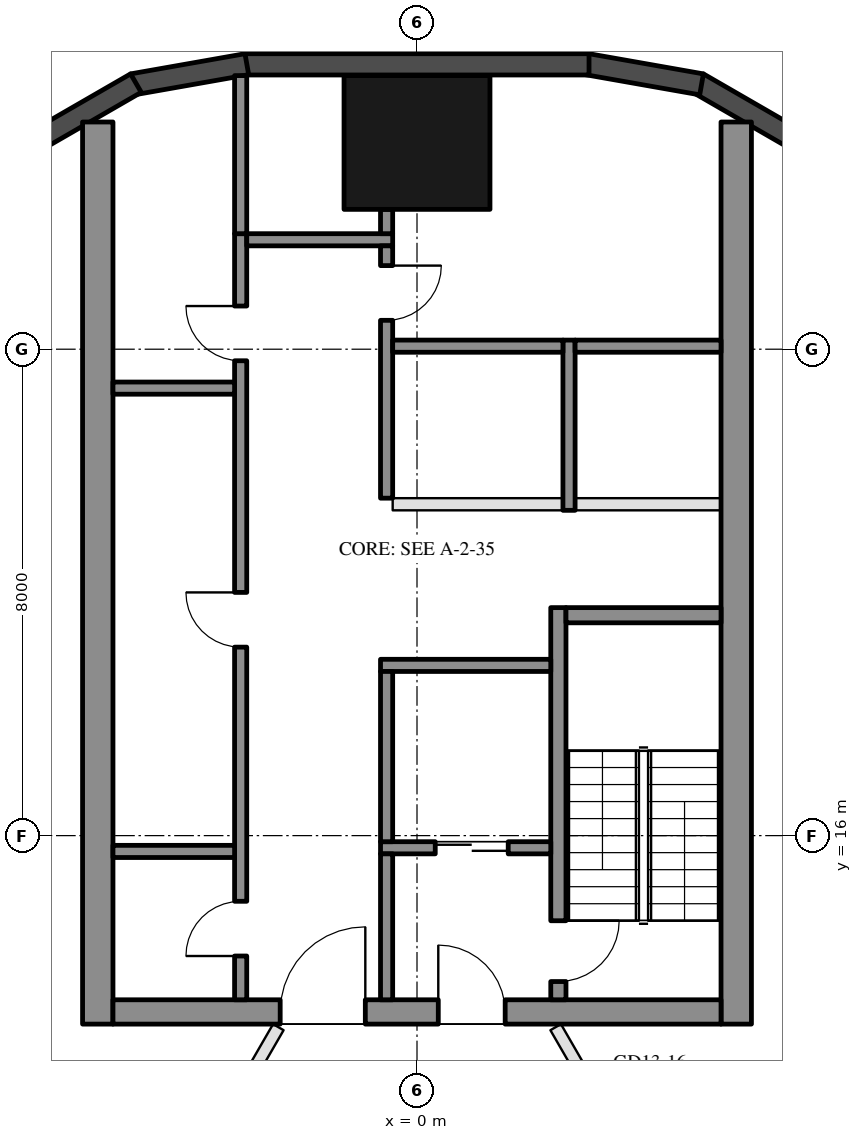
"""IFC4 building model, lengths in metres.
Left out: names, types, materials, properties, quantities, classifications, styles, units other than length and angle.
Written with IfcOpenShell. Run it as: python <this file> out.ifc"""

import sys

from ifc_helpers import new_model, si_unit, direction, frame, frame_2d, origin, origin_2d, place, context, subcontext, project, spatial, rectangle, hollow_rectangle, extrude, element, fill, save


model = new_model("IFC4")
c1 = context("Model", 3, precision=1e-05, world=origin(), true_north=direction((0.0, 1.0)))
c2 = subcontext(c1, "Body", "Model", "MODEL_VIEW")
j1 = project(units=[si_unit("LENGTHUNIT", "METRE"), si_unit("PLANEANGLEUNIT", "RADIAN")], contexts=[c1])
p1 = place(None, origin())
s1 = spatial("IfcSite", under=j1, at=p1, CompositionType="ELEMENT")
p2 = place(p1, origin())
s2 = spatial("IfcBuilding", under=s1, at=p2, CompositionType="ELEMENT")
p3 = place(p2, frame((0.0, 0.0, 154.0)))
s3 = spatial("IfcBuildingStorey", under=s2, at=p3, CompositionType="ELEMENT", Elevation=154.0)
p4 = place(p3, frame((0.0, 27.4, 0.0), z_axis=(0.0, 0.0, 1.0), x_axis=(1.0, 0.0, 0.0)))
e1 = element("IfcColumn", 1, at=p4, inside=s3, PredefinedType="COLUMN", context=c2, shape_type="SweptSolid", body=[
    extrude(hollow_rectangle(XDim=2.4, YDim=2.2, WallThickness=0.06, at=origin_2d()), origin(), (0.0, 0.0, 1.0), 3.7),
])
for number, where, z_axis, x_axis in (
    (2, (6.277, 27.422, 0.0), (0.0, 0.0, 1.0), (-0.866, 0.5, 0.0)),
    (3, (4.68, 28.356, 0.0), (0.0, 0.0, 1.0), (-0.985, 0.174, 0.0)),
):
    element("IfcWall", number, at=place(p3, frame(where, z_axis=z_axis, x_axis=x_axis)), inside=s3, PredefinedType="SOLIDWALL", context=c2, shape_type="SweptSolid", body=[
        extrude(rectangle(XDim=1.91, YDim=0.35, at=frame_2d((0.955, 0.0))), origin(), (0.0, 0.0, 1.0), 3.55),
    ])
p5 = place(p3, frame((2.829, 28.685, 0.0), z_axis=(0.0, 0.0, 1.0), x_axis=(-1.0, 0.0, 0.0)))
e4 = element("IfcWall", 4, at=p5, inside=s3, PredefinedType="SOLIDWALL", context=c2, shape_type="SweptSolid", body=[
    extrude(rectangle(XDim=5.658, YDim=0.35, at=frame_2d((2.829, 0.0))), origin(), (0.0, 0.0, 1.0), 3.55),
])
for number, where, z_axis, x_axis in (
    (5, (-2.799, 28.688, 0.0), (0.0, 0.0, 1.0), (-0.985, -0.174, 0.0)),
    (6, (-4.623, 28.377, 0.0), (0.0, 0.0, 1.0), (-0.866, -0.5, 0.0)),
):
    element("IfcWall", number, at=place(p3, frame(where, z_axis=z_axis, x_axis=x_axis)), inside=s3, PredefinedType="SOLIDWALL", context=c2, shape_type="SweptSolid", body=[
        extrude(rectangle(XDim=1.91, YDim=0.35, at=frame_2d((0.955, 0.0))), origin(), (0.0, 0.0, 1.0), 3.55),
    ])
for number, where, z_axis, x_axis in (
    (7, (5.25, 12.9, 0.0), (0.0, 0.0, 1.0), (0.0, 1.0, 0.0)),
    (8, (-5.25, 12.9, 0.0), (0.0, 0.0, 1.0), (0.0, 1.0, 0.0)),
):
    element("IfcWall", number, at=place(p3, frame(where, z_axis=z_axis, x_axis=x_axis)), inside=s3, PredefinedType="SHEAR", context=c2, shape_type="SweptSolid", body=[
        extrude(rectangle(XDim=14.837, YDim=0.5, at=frame_2d((7.418, 0.0))), origin(), (0.0, 0.0, 1.0), 3.5),
    ])
p6 = place(p3, frame((5.0, 13.1, 0.0), z_axis=(0.0, 0.0, 1.0), x_axis=(-1.0, 0.0, 0.0)))
e9 = element("IfcWall", 9, at=p6, inside=s3, PredefinedType="SHEAR", context=c2, shape_type="SweptSolid", body=[
    extrude(rectangle(XDim=10.0, YDim=0.4, at=frame_2d((5.0, 0.0))), origin(), (0.0, 0.0, 1.0), 3.5),
])
p7 = place(p6, frame((3.55, 0.0, 0.0)))
e10 = element("IfcOpeningElement", 10, at=p7, cuts=e9, PredefinedType="OPENING", context=c2, shape_type="SweptSolid", body=[
    extrude(rectangle(XDim=1.1, YDim=2.1, at=frame_2d((0.55, 1.05))), frame((0.0, 0.21, 0.0), z_axis=(0.0, -1.0, 0.0), x_axis=(1.0, 0.0, 0.0)), (0.0, 0.0, 1.0), 0.42),
])
p8 = place(p6, frame((5.85, 0.0, 0.0)))
e11 = element("IfcOpeningElement", 11, at=p8, cuts=e9, PredefinedType="OPENING", context=c2, shape_type="SweptSolid", body=[
    extrude(rectangle(XDim=1.4, YDim=2.1, at=frame_2d((0.7, 1.05))), frame((0.0, 0.21, 0.0), z_axis=(0.0, -1.0, 0.0), x_axis=(1.0, 0.0, 0.0)), (0.0, 0.0, 1.0), 0.42),
])
p9 = place(p3, frame((2.325, 13.3, 0.0), z_axis=(0.0, 0.0, 1.0), x_axis=(0.0, 1.0, 0.0)))
e12 = element("IfcWall", 12, at=p9, inside=s3, PredefinedType="SHEAR", context=c2, shape_type="SweptSolid", body=[
    extrude(rectangle(XDim=6.45, YDim=0.25, at=frame_2d((3.225, 0.0))), origin(), (0.0, 0.0, 1.0), 3.5),
])
p10 = place(p9, frame((0.3, 0.0, 0.0)))
e13 = element("IfcOpeningElement", 13, at=p10, cuts=e12, PredefinedType="OPENING", context=c2, shape_type="SweptSolid", body=[
    extrude(rectangle(XDim=1.0, YDim=2.1, at=frame_2d((0.5, 1.05))), frame((0.0, 0.135, 0.0), z_axis=(0.0, -1.0, 0.0), x_axis=(1.0, 0.0, 0.0)), (0.0, 0.0, 1.0), 0.27),
])
p11 = place(p3, frame((5.0, 19.625, 0.0), z_axis=(0.0, 0.0, 1.0), x_axis=(-1.0, 0.0, 0.0)))
e14 = element("IfcWall", 14, at=p11, inside=s3, PredefinedType="SHEAR", context=c2, shape_type="SweptSolid", body=[
    extrude(rectangle(XDim=2.55, YDim=0.25, at=frame_2d((1.275, 0.0))), origin(), (0.0, 0.0, 1.0), 3.5),
])
p12 = place(p3, frame((2.2, 18.8, 0.0), z_axis=(0.0, 0.0, 1.0), x_axis=(-1.0, 0.0, 0.0)))
e15 = element("IfcWall", 15, at=p12, inside=s3, PredefinedType="SHEAR", context=c2, shape_type="SweptSolid", body=[
    extrude(rectangle(XDim=2.8, YDim=0.2, at=frame_2d((1.4, 0.0))), origin(), (0.0, 0.0, 1.0), 3.5),
])
p13 = place(p3, frame((2.2, 15.8, 0.0), z_axis=(0.0, 0.0, 1.0), x_axis=(-1.0, 0.0, 0.0)))
e16 = element("IfcWall", 16, at=p13, inside=s3, PredefinedType="SHEAR", context=c2, shape_type="SweptSolid", body=[
    extrude(rectangle(XDim=2.8, YDim=0.2, at=frame_2d((1.4, 0.0))), origin(), (0.0, 0.0, 1.0), 3.5),
])
p14 = place(p13, frame((0.7, 0.0, 0.0)))
e17 = element("IfcOpeningElement", 17, at=p14, cuts=e16, PredefinedType="OPENING", context=c2, shape_type="SweptSolid", body=[
    extrude(rectangle(XDim=1.2, YDim=2.1, at=frame_2d((0.6, 1.05))), frame((0.0, 0.11, 0.0), z_axis=(0.0, -1.0, 0.0), x_axis=(1.0, 0.0, 0.0)), (0.0, 0.0, 1.0), 0.22),
])
p15 = place(p3, frame((-0.5, 15.9, 0.0), z_axis=(0.0, 0.0, 1.0), x_axis=(0.0, 1.0, 0.0)))
e18 = element("IfcWall", 18, at=p15, inside=s3, PredefinedType="SHEAR", context=c2, shape_type="SweptSolid", body=[
    extrude(rectangle(XDim=2.8, YDim=0.2, at=frame_2d((1.4, 0.0))), origin(), (0.0, 0.0, 1.0), 3.5),
])
p16 = place(p3, frame((-0.5, 13.3, 0.0), z_axis=(0.0, 0.0, 1.0), x_axis=(0.0, 1.0, 0.0)))
e19 = element("IfcWall", 19, at=p16, inside=s3, PredefinedType="SHEAR", context=c2, shape_type="SweptSolid", body=[
    extrude(rectangle(XDim=2.4, YDim=0.2, at=frame_2d((1.2, 0.0))), origin(), (0.0, 0.0, 1.0), 3.5),
])
p17 = place(p3, frame((-2.9, 13.3, 0.0), z_axis=(0.0, 0.0, 1.0), x_axis=(0.0, 1.0, 0.0)))
e20 = element("IfcWall", 20, at=p17, inside=s3, PredefinedType="SHEAR", context=c2, shape_type="SweptSolid", body=[
    extrude(rectangle(XDim=12.6, YDim=0.2, at=frame_2d((6.3, 0.0))), origin(), (0.0, 0.0, 1.0), 3.5),
])
p18 = place(p17, frame((0.72, 0.0, 0.0)))
e21 = element("IfcOpeningElement", 21, at=p18, cuts=e20, PredefinedType="OPENING", context=c2, shape_type="SweptSolid", body=[
    extrude(rectangle(XDim=0.9, YDim=2.1, at=frame_2d((0.45, 1.05))), frame((0.0, 0.11, 0.0), z_axis=(0.0, -1.0, 0.0), x_axis=(1.0, 0.0, 0.0)), (0.0, 0.0, 1.0), 0.22),
])
p19 = place(p17, frame((5.8, 0.0, 0.0)))
e22 = element("IfcOpeningElement", 22, at=p19, cuts=e20, PredefinedType="OPENING", context=c2, shape_type="SweptSolid", body=[
    extrude(rectangle(XDim=0.9, YDim=2.1, at=frame_2d((0.45, 1.05))), frame((0.0, 0.11, 0.0), z_axis=(0.0, -1.0, 0.0), x_axis=(1.0, 0.0, 0.0)), (0.0, 0.0, 1.0), 0.22),
])
p20 = place(p17, frame((10.51, 0.0, 0.0)))
e23 = element("IfcOpeningElement", 23, at=p20, cuts=e20, PredefinedType="OPENING", context=c2, shape_type="SweptSolid", body=[
    extrude(rectangle(XDim=0.9, YDim=2.1, at=frame_2d((0.45, 1.05))), frame((0.0, 0.11, 0.0), z_axis=(0.0, -1.0, 0.0), x_axis=(1.0, 0.0, 0.0)), (0.0, 0.0, 1.0), 0.22),
])
p21 = place(p3, frame((-0.4, 25.8, 0.0), z_axis=(0.0, 0.0, 1.0), x_axis=(-1.0, 0.0, 0.0)))
e24 = element("IfcWall", 24, at=p21, inside=s3, PredefinedType="SHEAR", context=c2, shape_type="SweptSolid", body=[
    extrude(rectangle(XDim=2.4, YDim=0.2, at=frame_2d((1.2, 0.0))), origin(), (0.0, 0.0, 1.0), 3.5),
])
p22 = place(p3, frame((-0.5, 21.55, 0.0), z_axis=(0.0, 0.0, 1.0), x_axis=(0.0, 1.0, 0.0)))
e25 = element("IfcWall", 25, at=p22, inside=s3, PredefinedType="SHEAR", context=c2, shape_type="SweptSolid", body=[
    extrude(rectangle(XDim=4.15, YDim=0.2, at=frame_2d((2.075, 0.0))), origin(), (0.0, 0.0, 1.0), 3.5),
])
p23 = place(p22, frame((2.925, 0.0, 0.0)))
e26 = element("IfcOpeningElement", 26, at=p23, cuts=e25, PredefinedType="OPENING", context=c2, shape_type="SweptSolid", body=[
    extrude(rectangle(XDim=0.9, YDim=2.1, at=frame_2d((0.45, 1.05))), frame((0.0, 0.11, 0.0), z_axis=(0.0, -1.0, 0.0), x_axis=(1.0, 0.0, 0.0)), (0.0, 0.0, 1.0), 0.22),
])
for number, where, z_axis, x_axis in (
    (27, (-3.0, 15.74, 0.0), (0.0, 0.0, 1.0), (-1.0, 0.0, 0.0)),
    (28, (-3.0, 23.36, 0.0), (0.0, 0.0, 1.0), (-1.0, 0.0, 0.0)),
):
    element("IfcWall", number, at=place(p3, frame(where, z_axis=z_axis, x_axis=x_axis)), inside=s3, PredefinedType="SHEAR", context=c2, shape_type="SweptSolid", body=[
        extrude(rectangle(XDim=2.0, YDim=0.2, at=frame_2d((1.0, 0.0))), origin(), (0.0, 0.0, 1.0), 3.5),
    ])
p24 = place(p3, frame((-0.5, 25.9, 0.0), z_axis=(0.0, 0.0, 1.0), x_axis=(0.0, 1.0, 0.0)))
e29 = element("IfcWall", 29, at=p24, inside=s3, PredefinedType="SHEAR", context=c2, shape_type="SweptSolid", body=[
    extrude(rectangle(XDim=0.4, YDim=0.2, at=frame_2d((0.2, 0.0))), origin(), (0.0, 0.0, 1.0), 3.5),
])
p25 = place(p3, frame((-2.9, 25.9, 0.0), z_axis=(0.0, 0.0, 1.0), x_axis=(0.0, 1.0, 0.0)))
e30 = element("IfcWall", 30, at=p25, inside=s3, PredefinedType="SHEAR", context=c2, shape_type="SweptSolid", body=[
    extrude(rectangle(XDim=2.6, YDim=0.2, at=frame_2d((1.3, 0.0))), origin(), (0.0, 0.0, 1.0), 3.5),
])
p26 = place(p3, frame((2.5, 21.35, 0.0), z_axis=(0.0, 0.0, 1.0), x_axis=(0.0, 1.0, 0.0)))
e31 = element("IfcWall", 31, at=p26, inside=s3, PredefinedType="SHEAR", context=c2, shape_type="SweptSolid", body=[
    extrude(rectangle(XDim=2.8, YDim=0.2, at=frame_2d((1.4, 0.0))), origin(), (0.0, 0.0, 1.0), 3.5),
])
p27 = place(p3, frame((5.0, 24.05, 0.0), z_axis=(0.0, 0.0, 1.0), x_axis=(-1.0, 0.0, 0.0)))
e32 = element("IfcWall", 32, at=p27, inside=s3, PredefinedType="SHEAR", context=c2, shape_type="SweptSolid", body=[
    extrude(rectangle(XDim=2.4, YDim=0.2, at=frame_2d((1.2, 0.0))), origin(), (0.0, 0.0, 1.0), 3.5),
])
p28 = place(p3, frame((2.4, 24.05, 0.0), z_axis=(0.0, 0.0, 1.0), x_axis=(-1.0, 0.0, 0.0)))
e33 = element("IfcWall", 33, at=p28, inside=s3, PredefinedType="SHEAR", context=c2, shape_type="SweptSolid", body=[
    extrude(rectangle(XDim=2.8, YDim=0.2, at=frame_2d((1.4, 0.0))), origin(), (0.0, 0.0, 1.0), 3.5),
])
p29 = place(p3, frame((5.0, 21.45, 0.0), z_axis=(0.0, 0.0, 1.0), x_axis=(-1.0, 0.0, 0.0)))
e34 = element("IfcWall", 34, at=p29, inside=s3, PredefinedType="PARTITIONING", context=c2, shape_type="SweptSolid", body=[
    extrude(rectangle(XDim=2.4, YDim=0.2, at=frame_2d((1.2, 0.0))), origin(), (0.0, 0.0, 1.0), 3.5),
])
p30 = place(p3, frame((2.4, 21.45, 0.0), z_axis=(0.0, 0.0, 1.0), x_axis=(-1.0, 0.0, 0.0)))
e35 = element("IfcWall", 35, at=p30, inside=s3, PredefinedType="PARTITIONING", context=c2, shape_type="SweptSolid", body=[
    extrude(rectangle(XDim=2.8, YDim=0.2, at=frame_2d((1.4, 0.0))), origin(), (0.0, 0.0, 1.0), 3.5),
])
p31 = place(p3, frame((14.257, 13.866, 0.0), z_axis=(0.0, 0.0, 1.0), x_axis=(-0.916761733334, -0.399434505638, 0.0)))
e36 = element("IfcWall", 36, at=p31, inside=s3, PredefinedType="PARTITIONING", context=c2, shape_type="SweptSolid", body=[
    extrude(rectangle(XDim=11.05, YDim=0.2, at=frame_2d((5.525, 0.0))), origin(), (0.0, 0.0, 1.0), 3.06),
])
p32 = place(p3, frame((-13.672, 13.08, 0.0), z_axis=(0.0, 0.0, 1.0), x_axis=(0.912311972773, -0.409495866077, 0.0)))
e37 = element("IfcWall", 37, at=p32, inside=s3, PredefinedType="PARTITIONING", context=c2, shape_type="SweptSolid", body=[
    extrude(rectangle(XDim=10.132, YDim=0.2, at=frame_2d((5.066, 0.0))), origin(), (0.0, 0.0, 1.0), 3.06),
])
p33 = place(p3, frame((2.281, 12.85, 0.0), z_axis=(0.0, 0.0, 1.0), x_axis=(0.499991068497, -0.866030560329, 0.0)))
e38 = element("IfcWall", 38, at=p33, inside=s3, PredefinedType="PARTITIONING", context=c2, shape_type="SweptSolid", body=[
    extrude(rectangle(XDim=3.776, YDim=0.2, at=frame_2d((1.888, 0.0))), origin(), (0.0, 0.0, 1.0), 2.95),
])
p34 = place(p33, frame((1.388, 0.0, 0.0)))
e39 = element("IfcOpeningElement", 39, at=p34, cuts=e38, PredefinedType="OPENING", context=c2, shape_type="SweptSolid", body=[
    extrude(rectangle(XDim=1.0, YDim=2.1, at=frame_2d((0.5, 1.05))), frame((0.0, 0.11, 0.0), z_axis=(0.0, -1.0, 0.0), x_axis=(1.0, 0.0, 0.0)), (0.0, 0.0, 1.0), 0.22),
])
p35 = place(p3, frame((-4.469, 9.059, 0.0), z_axis=(0.0, 0.0, 1.0), x_axis=(0.499996027077, 0.86602769754, 0.0)))
e40 = element("IfcWall", 40, at=p35, inside=s3, PredefinedType="PARTITIONING", context=c2, shape_type="SweptSolid", body=[
    extrude(rectangle(XDim=4.377, YDim=0.2, at=frame_2d((2.189, 0.0))), origin(), (0.0, 0.0, 1.0), 2.95),
])
p36 = place(p35, frame((1.689, 0.0, 0.0)))
e41 = element("IfcOpeningElement", 41, at=p36, cuts=e40, PredefinedType="OPENING", context=c2, shape_type="SweptSolid", body=[
    extrude(rectangle(XDim=1.0, YDim=2.1, at=frame_2d((0.5, 1.05))), frame((0.0, 0.11, 0.0), z_axis=(0.0, -1.0, 0.0), x_axis=(1.0, 0.0, 0.0)), (0.0, 0.0, 1.0), 0.22),
])
p37 = place(p14, origin())
e42 = element("IfcDoor", 42, at=p37, inside=s3, OperationType="DOUBLE_DOOR_SLIDING", PredefinedType="DOOR", context=c2, shape_type="SweptSolid", body=[
    extrude(rectangle(XDim=1.2, YDim=2.1, at=frame_2d((0.6, 1.05))), frame((0.0, 0.025, 0.0), z_axis=(0.0, -1.0, 0.0), x_axis=(1.0, 0.0, 0.0)), (0.0, 0.0, 1.0), 0.05),
])
fill(e17, e42)
p38 = place(p18, origin())
e43 = element("IfcDoor", 43, at=p38, inside=s3, OperationType="SINGLE_SWING_LEFT", PredefinedType="DOOR", context=c2, shape_type="SweptSolid", body=[
    extrude(rectangle(XDim=0.9, YDim=2.1, at=frame_2d((0.45, 1.05))), frame((0.0, 0.025, 0.0), z_axis=(0.0, -1.0, 0.0), x_axis=(1.0, 0.0, 0.0)), (0.0, 0.0, 1.0), 0.05),
])
fill(e21, e43)
p39 = place(p19, origin())
e44 = element("IfcDoor", 44, at=p39, inside=s3, OperationType="SINGLE_SWING_RIGHT", PredefinedType="DOOR", context=c2, shape_type="SweptSolid", body=[
    extrude(rectangle(XDim=0.9, YDim=2.1, at=frame_2d((0.45, 1.05))), frame((0.0, 0.025, 0.0), z_axis=(0.0, -1.0, 0.0), x_axis=(1.0, 0.0, 0.0)), (0.0, 0.0, 1.0), 0.05),
])
fill(e22, e44)
p40 = place(p20, origin())
e45 = element("IfcDoor", 45, at=p40, inside=s3, OperationType="SINGLE_SWING_RIGHT", PredefinedType="DOOR", context=c2, shape_type="SweptSolid", body=[
    extrude(rectangle(XDim=0.9, YDim=2.1, at=frame_2d((0.45, 1.05))), frame((0.0, 0.025, 0.0), z_axis=(0.0, -1.0, 0.0), x_axis=(1.0, 0.0, 0.0)), (0.0, 0.0, 1.0), 0.05),
])
fill(e23, e45)
p41 = place(p23, frame((0.9, 0.0, 0.0), z_axis=(0.0, 0.0, 1.0), x_axis=(-1.0, 0.0, 0.0)))
e46 = element("IfcDoor", 46, at=p41, inside=s3, OperationType="SINGLE_SWING_LEFT", PredefinedType="DOOR", context=c2, shape_type="SweptSolid", body=[
    extrude(rectangle(XDim=0.9, YDim=2.1, at=frame_2d((0.45, 1.05))), frame((0.0, 0.025, 0.0), z_axis=(0.0, -1.0, 0.0), x_axis=(1.0, 0.0, 0.0)), (0.0, 0.0, 1.0), 0.05),
])
fill(e26, e46)
p42 = place(p7, frame((1.1, 0.0, 0.0), z_axis=(0.0, 0.0, 1.0), x_axis=(-1.0, 0.0, 0.0)))
e47 = element("IfcDoor", 47, at=p42, inside=s3, OperationType="SINGLE_SWING_LEFT", PredefinedType="DOOR", context=c2, shape_type="SweptSolid", body=[
    extrude(rectangle(XDim=1.1, YDim=2.1, at=frame_2d((0.55, 1.05))), frame((0.0, 0.025, 0.0), z_axis=(0.0, -1.0, 0.0), x_axis=(1.0, 0.0, 0.0)), (0.0, 0.0, 1.0), 0.05),
])
fill(e10, e47)
p43 = place(p8, frame((1.4, 0.0, 0.0), z_axis=(0.0, 0.0, 1.0), x_axis=(-1.0, 0.0, 0.0)))
e48 = element("IfcDoor", 48, at=p43, inside=s3, OperationType="DOUBLE_DOOR_SINGLE_SWING", PredefinedType="DOOR", context=c2, shape_type="SweptSolid", body=[
    extrude(rectangle(XDim=1.4, YDim=2.1, at=frame_2d((0.7, 1.05))), frame((0.0, 0.025, 0.0), z_axis=(0.0, -1.0, 0.0), x_axis=(1.0, 0.0, 0.0)), (0.0, 0.0, 1.0), 0.05),
])
fill(e11, e48)
p44 = place(p10, frame((1.0, 0.0, 0.0), z_axis=(0.0, 0.0, 1.0), x_axis=(-1.0, 0.0, 0.0)))
e49 = element("IfcDoor", 49, at=p44, inside=s3, OperationType="SINGLE_SWING_LEFT", PredefinedType="DOOR", context=c2, shape_type="SweptSolid", body=[
    extrude(rectangle(XDim=1.0, YDim=2.1, at=frame_2d((0.5, 1.05))), frame((0.0, 0.025, 0.0), z_axis=(0.0, -1.0, 0.0), x_axis=(1.0, 0.0, 0.0)), (0.0, 0.0, 1.0), 0.05),
])
fill(e13, e49)
save(model, sys.argv[1])
